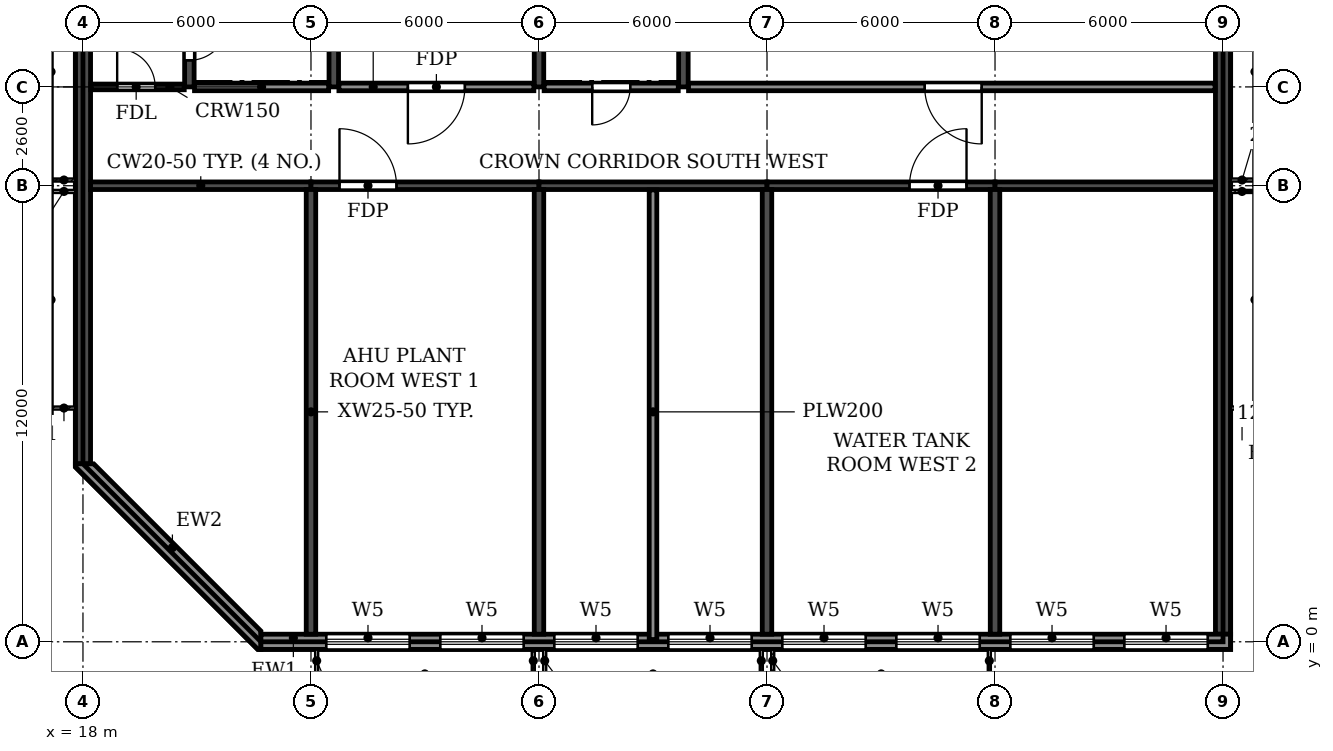
"""IFC4 building model, lengths in metres.
Left out: names, types, materials, properties, quantities, classifications, styles, units other than length and angle.
Written with IfcOpenShell. Run it as: python <this file> out.ifc"""

import sys

from ifc_helpers import new_model, si_unit, direction, frame, frame_2d, origin, place, context, subcontext, project, spatial, polyline, rectangle, outline, extrude, element, fill, save


model = new_model("IFC4")
c1 = context("Model", 3, precision=1e-05, world=origin(), true_north=direction((0.0, 1.0)))
c2 = subcontext(c1, "Body", "Model", "MODEL_VIEW")
j1 = project(units=[si_unit("LENGTHUNIT", "METRE"), si_unit("PLANEANGLEUNIT", "RADIAN")], contexts=[c1])
p1 = place(None, origin())
s1 = spatial("IfcSite", under=j1, at=p1, CompositionType="ELEMENT")
p2 = place(p1, origin())
s2 = spatial("IfcBuilding", under=s1, at=p2, CompositionType="ELEMENT")
p3 = place(p2, frame((0.0, 0.0, 288.9)))
s3 = spatial("IfcBuildingStorey", under=s2, at=p3, CompositionType="ELEMENT", Elevation=288.9)
for number, where, z_axis, x_axis in (
    (1, (24.0, 0.2, 0.0), (0.0, 0.0, 1.0), (0.0, 1.0, 0.0)),
    (2, (30.0, 0.2, 0.0), (0.0, 0.0, 1.0), (0.0, 1.0, 0.0)),
    (3, (36.0, 0.2, 0.0), (0.0, 0.0, 1.0), (0.0, 1.0, 0.0)),
    (4, (42.0, 0.2, 0.0), (0.0, 0.0, 1.0), (0.0, 1.0, 0.0)),
):
    element("IfcWall", number, at=place(p3, frame(where, z_axis=z_axis, x_axis=x_axis)), inside=s3, PredefinedType="SHEAR", context=c2, shape_type="SweptSolid", body=[
        extrude(rectangle(XDim=11.7, YDim=0.25, at=frame_2d((5.85, 0.0))), origin(), (0.0, 0.0, 1.0), 3.05),
    ])
p4 = place(p3, frame((18.0, 4.683, 0.0), z_axis=(0.0, 0.0, 1.0), x_axis=(0.0, 1.0, 0.0)))
e5 = element("IfcWall", 5, at=p4, inside=s3, PredefinedType="SHEAR", context=c2, shape_type="SweptSolid", body=[
    extrude(rectangle(XDim=31.834, YDim=0.4, at=frame_2d((15.917, 0.0))), origin(), (0.0, 0.0, 1.0), 3.05),
])
p5 = place(p3, frame((48.0, 0.2, 0.0), z_axis=(0.0, 0.0, 1.0), x_axis=(0.0, 1.0, 0.0)))
e6 = element("IfcWall", 6, at=p5, inside=s3, PredefinedType="SHEAR", context=c2, shape_type="SweptSolid", body=[
    extrude(rectangle(XDim=40.8, YDim=0.4, at=frame_2d((20.4, 0.0))), origin(), (0.0, 0.0, 1.0), 3.05),
])
p6 = place(p3, frame((18.2, 12.0, 0.0), z_axis=(0.0, 0.0, 1.0), x_axis=(1.0, 0.0, 0.0)))
e7 = element("IfcWall", 7, at=p6, inside=s3, PredefinedType="SHEAR", context=c2, shape_type="SweptSolid", body=[
    extrude(rectangle(XDim=5.8, YDim=0.2, at=frame_2d((2.9, 0.0))), origin(), (0.0, 0.0, 1.0), 2.45),
])
p7 = place(p3, frame((24.0, 12.0, 0.0), z_axis=(0.0, 0.0, 1.0), x_axis=(1.0, 0.0, 0.0)))
e8 = element("IfcWall", 8, at=p7, inside=s3, PredefinedType="SHEAR", context=c2, shape_type="SweptSolid", body=[
    extrude(rectangle(XDim=6.0, YDim=0.2, at=frame_2d((3.0, 0.0))), origin(), (0.0, 0.0, 1.0), 2.45),
])
p8 = place(p7, frame((0.75, 0.0, 0.0)))
e9 = element("IfcOpeningElement", 9, at=p8, cuts=e8, PredefinedType="OPENING", context=c2, shape_type="SweptSolid", body=[
    extrude(rectangle(XDim=1.5, YDim=2.1, at=frame_2d((0.75, 1.05))), frame((0.0, 0.11, 0.0), z_axis=(0.0, -1.0, 0.0), x_axis=(1.0, 0.0, 0.0)), (0.0, 0.0, 1.0), 0.22),
])
p9 = place(p3, frame((30.0, 12.0, 0.0), z_axis=(0.0, 0.0, 1.0), x_axis=(1.0, 0.0, 0.0)))
e10 = element("IfcWall", 10, at=p9, inside=s3, PredefinedType="SHEAR", context=c2, shape_type="SweptSolid", body=[
    extrude(rectangle(XDim=6.0, YDim=0.2, at=frame_2d((3.0, 0.0))), origin(), (0.0, 0.0, 1.0), 2.45),
])
p10 = place(p3, frame((36.0, 12.0, 0.0), z_axis=(0.0, 0.0, 1.0), x_axis=(1.0, 0.0, 0.0)))
e11 = element("IfcWall", 11, at=p10, inside=s3, PredefinedType="SHEAR", context=c2, shape_type="SweptSolid", body=[
    extrude(rectangle(XDim=6.0, YDim=0.2, at=frame_2d((3.0, 0.0))), origin(), (0.0, 0.0, 1.0), 2.45),
])
p11 = place(p10, frame((3.75, 0.0, 0.0)))
e12 = element("IfcOpeningElement", 12, at=p11, cuts=e11, PredefinedType="OPENING", context=c2, shape_type="SweptSolid", body=[
    extrude(rectangle(XDim=1.5, YDim=2.1, at=frame_2d((0.75, 1.05))), frame((0.0, 0.11, 0.0), z_axis=(0.0, -1.0, 0.0), x_axis=(1.0, 0.0, 0.0)), (0.0, 0.0, 1.0), 0.22),
])
p12 = place(p3, frame((42.0, 12.0, 0.0), z_axis=(0.0, 0.0, 1.0), x_axis=(1.0, 0.0, 0.0)))
e13 = element("IfcWall", 13, at=p12, inside=s3, PredefinedType="SHEAR", context=c2, shape_type="SweptSolid", body=[
    extrude(rectangle(XDim=5.8, YDim=0.2, at=frame_2d((2.9, 0.0))), origin(), (0.0, 0.0, 1.0), 2.45),
])
p13 = place(p3, frame((20.8, 14.6, 0.0), z_axis=(0.0, 0.0, 1.0), x_axis=(0.0, 1.0, 0.0)))
e14 = element("IfcWall", 14, at=p13, inside=s3, PredefinedType="SOLIDWALL", context=c2, shape_type="SweptSolid", body=[
    extrude(rectangle(XDim=7.875, YDim=0.25, at=frame_2d((3.938, 0.0))), origin(), (0.0, 0.0, 1.0), 3.05),
])
p14 = place(p13, frame((0.7, 0.0, 0.0)))
e15 = element("IfcOpeningElement", 15, at=p14, cuts=e14, PredefinedType="OPENING", context=c2, shape_type="SweptSolid", body=[
    extrude(rectangle(XDim=1.0, YDim=2.1, at=frame_2d((0.5, 1.05))), frame((0.0, 0.135, 0.0), z_axis=(0.0, -1.0, 0.0), x_axis=(1.0, 0.0, 0.0)), (0.0, 0.0, 1.0), 0.27),
])
for number, where, z_axis, x_axis in (
    (16, (24.6, 14.6, 0.0), (0.0, 0.0, 1.0), (0.0, 1.0, 0.0)),
    (17, (30.0, 14.6, 0.0), (0.0, 0.0, 1.0), (0.0, 1.0, 0.0)),
    (18, (33.8, 14.6, 0.0), (0.0, 0.0, 1.0), (0.0, 1.0, 0.0)),
):
    element("IfcWall", number, at=place(p3, frame(where, z_axis=z_axis, x_axis=x_axis)), inside=s3, PredefinedType="SOLIDWALL", context=c2, shape_type="SweptSolid", body=[
        extrude(rectangle(XDim=7.875, YDim=0.25, at=frame_2d((3.938, 0.0))), origin(), (0.0, 0.0, 1.0), 3.05),
    ])
p15 = place(p3, frame((22.683, 0.0, 0.0), z_axis=(0.0, 0.0, 1.0), x_axis=(1.0, 0.0, 0.0)))
e19 = element("IfcWall", 19, at=p15, inside=s3, PredefinedType="STANDARD", context=c2, shape_type="SweptSolid", body=[
    extrude(rectangle(XDim=25.517, YDim=0.4, at=frame_2d((12.759, 0.0))), origin(), (0.0, 0.0, 1.0), 3.05),
])
p16 = place(p15, frame((1.717, 0.0, 0.6)))
e20 = element("IfcOpeningElement", 20, at=p16, cuts=e19, PredefinedType="OPENING", context=c2, shape_type="SweptSolid", body=[
    extrude(rectangle(XDim=2.2, YDim=2.4, at=frame_2d((1.1, 1.2))), frame((0.0, 0.21, 0.0), z_axis=(0.0, -1.0, 0.0), x_axis=(1.0, 0.0, 0.0)), (0.0, 0.0, 1.0), 0.42),
])
p17 = place(p15, frame((4.717, 0.0, 0.6)))
e21 = element("IfcOpeningElement", 21, at=p17, cuts=e19, PredefinedType="OPENING", context=c2, shape_type="SweptSolid", body=[
    extrude(rectangle(XDim=2.2, YDim=2.4, at=frame_2d((1.1, 1.2))), frame((0.0, 0.21, 0.0), z_axis=(0.0, -1.0, 0.0), x_axis=(1.0, 0.0, 0.0)), (0.0, 0.0, 1.0), 0.42),
])
p18 = place(p15, frame((7.717, 0.0, 0.6)))
e22 = element("IfcOpeningElement", 22, at=p18, cuts=e19, PredefinedType="OPENING", context=c2, shape_type="SweptSolid", body=[
    extrude(rectangle(XDim=2.2, YDim=2.4, at=frame_2d((1.1, 1.2))), frame((0.0, 0.21, 0.0), z_axis=(0.0, -1.0, 0.0), x_axis=(1.0, 0.0, 0.0)), (0.0, 0.0, 1.0), 0.42),
])
p19 = place(p15, frame((10.717, 0.0, 0.6)))
e23 = element("IfcOpeningElement", 23, at=p19, cuts=e19, PredefinedType="OPENING", context=c2, shape_type="SweptSolid", body=[
    extrude(rectangle(XDim=2.2, YDim=2.4, at=frame_2d((1.1, 1.2))), frame((0.0, 0.21, 0.0), z_axis=(0.0, -1.0, 0.0), x_axis=(1.0, 0.0, 0.0)), (0.0, 0.0, 1.0), 0.42),
])
p20 = place(p15, frame((13.717, 0.0, 0.6)))
e24 = element("IfcOpeningElement", 24, at=p20, cuts=e19, PredefinedType="OPENING", context=c2, shape_type="SweptSolid", body=[
    extrude(rectangle(XDim=2.2, YDim=2.4, at=frame_2d((1.1, 1.2))), frame((0.0, 0.21, 0.0), z_axis=(0.0, -1.0, 0.0), x_axis=(1.0, 0.0, 0.0)), (0.0, 0.0, 1.0), 0.42),
])
p21 = place(p15, frame((16.717, 0.0, 0.6)))
e25 = element("IfcOpeningElement", 25, at=p21, cuts=e19, PredefinedType="OPENING", context=c2, shape_type="SweptSolid", body=[
    extrude(rectangle(XDim=2.2, YDim=2.4, at=frame_2d((1.1, 1.2))), frame((0.0, 0.21, 0.0), z_axis=(0.0, -1.0, 0.0), x_axis=(1.0, 0.0, 0.0)), (0.0, 0.0, 1.0), 0.42),
])
p22 = place(p15, frame((19.717, 0.0, 0.6)))
e26 = element("IfcOpeningElement", 26, at=p22, cuts=e19, PredefinedType="OPENING", context=c2, shape_type="SweptSolid", body=[
    extrude(rectangle(XDim=2.2, YDim=2.4, at=frame_2d((1.1, 1.2))), frame((0.0, 0.21, 0.0), z_axis=(0.0, -1.0, 0.0), x_axis=(1.0, 0.0, 0.0)), (0.0, 0.0, 1.0), 0.42),
])
p23 = place(p15, frame((22.717, 0.0, 0.6)))
e27 = element("IfcOpeningElement", 27, at=p23, cuts=e19, PredefinedType="OPENING", context=c2, shape_type="SweptSolid", body=[
    extrude(rectangle(XDim=2.2, YDim=2.4, at=frame_2d((1.1, 1.2))), frame((0.0, 0.21, 0.0), z_axis=(0.0, -1.0, 0.0), x_axis=(1.0, 0.0, 0.0)), (0.0, 0.0, 1.0), 0.42),
])
p24 = place(p3, origin())
e28 = element("IfcWall", 28, at=p24, inside=s3, PredefinedType="STANDARD", context=c2, shape_type="SweptSolid", body=[
    extrude(outline(polyline([(17.8, 4.683), (17.8, 4.6), (22.6, -0.2), (22.683, -0.2), (22.683, 0.283), (18.283, 4.683), (17.8, 4.683)])), origin(), (0.0, 0.0, 1.0), 3.05),
])
p25 = place(p3, frame((0.0, 0.0, 3.3)))
e29 = element("IfcWall", 29, at=p25, inside=s3, PredefinedType="PARAPET", context=c2, shape_type="SweptSolid", body=[
    extrude(outline(polyline([(22.6, -0.2), (48.2, -0.2), (48.2, 41.4), (22.6, 41.4), (17.8, 36.6), (17.8, 4.6), (22.6, -0.2)]), holes=[polyline([(22.683, 0.0), (18.0, 4.683), (18.0, 36.517), (22.683, 41.2), (48.0, 41.2), (48.0, 0.0), (22.683, 0.0)])]), origin(), (0.0, 0.0, 1.0), 1.1),
])
p26 = place(p3, frame((18.21, 14.6, 0.0), z_axis=(0.0, 0.0, 1.0), x_axis=(1.0, 0.0, 0.0)))
e30 = element("IfcWall", 30, at=p26, inside=s3, PredefinedType="PARTITIONING", context=c2, shape_type="SweptSolid", body=[
    extrude(rectangle(XDim=2.455, YDim=0.15, at=frame_2d((1.228, 0.0))), origin(), (0.0, 0.0, 1.0), 3.05),
])
p27 = place(p26, frame((0.69, 0.0, 0.0)))
e31 = element("IfcOpeningElement", 31, at=p27, cuts=e30, PredefinedType="OPENING", context=c2, shape_type="SweptSolid", body=[
    extrude(rectangle(XDim=1.0, YDim=2.1, at=frame_2d((0.5, 1.05))), frame((0.0, 0.085, 0.0), z_axis=(0.0, -1.0, 0.0), x_axis=(1.0, 0.0, 0.0)), (0.0, 0.0, 1.0), 0.17),
])
p28 = place(p3, frame((24.735, 14.6, 0.0), z_axis=(0.0, 0.0, 1.0), x_axis=(1.0, 0.0, 0.0)))
e32 = element("IfcWall", 32, at=p28, inside=s3, PredefinedType="PARTITIONING", context=c2, shape_type="SweptSolid", body=[
    extrude(rectangle(XDim=5.13, YDim=0.2, at=frame_2d((2.565, 0.0))), origin(), (0.0, 0.0, 1.0), 3.05),
])
p29 = place(p28, frame((1.815, 0.0, 0.0)))
e33 = element("IfcOpeningElement", 33, at=p29, cuts=e32, PredefinedType="OPENING", context=c2, shape_type="SweptSolid", body=[
    extrude(rectangle(XDim=1.5, YDim=2.1, at=frame_2d((0.75, 1.05))), frame((0.0, 0.11, 0.0), z_axis=(0.0, -1.0, 0.0), x_axis=(1.0, 0.0, 0.0)), (0.0, 0.0, 1.0), 0.22),
])
p30 = place(p3, frame((33.935, 14.6, 0.0), z_axis=(0.0, 0.0, 1.0), x_axis=(1.0, 0.0, 0.0)))
e34 = element("IfcWall", 34, at=p30, inside=s3, PredefinedType="PARTITIONING", context=c2, shape_type="SweptSolid", body=[
    extrude(rectangle(XDim=13.855, YDim=0.2, at=frame_2d((6.927, 0.0))), origin(), (0.0, 0.0, 1.0), 3.05),
])
p31 = place(p30, frame((6.215, 0.0, 0.0)))
e35 = element("IfcOpeningElement", 35, at=p31, cuts=e34, PredefinedType="OPENING", context=c2, shape_type="SweptSolid", body=[
    extrude(rectangle(XDim=1.5, YDim=2.1, at=frame_2d((0.75, 1.05))), frame((0.0, 0.11, 0.0), z_axis=(0.0, -1.0, 0.0), x_axis=(1.0, 0.0, 0.0)), (0.0, 0.0, 1.0), 0.22),
])
p32 = place(p3, frame((33.0, 0.06, 0.0), z_axis=(0.0, 0.0, 1.0), x_axis=(0.0, 1.0, 0.0)))
e36 = element("IfcWall", 36, at=p32, inside=s3, PredefinedType="PARTITIONING", context=c2, shape_type="SweptSolid", body=[
    extrude(rectangle(XDim=11.83, YDim=0.2, at=frame_2d((5.915, 0.0))), origin(), (0.0, 0.0, 1.0), 3.05),
])
p33 = place(p3, frame((20.935, 14.6, 0.0), z_axis=(0.0, 0.0, 1.0), x_axis=(1.0, 0.0, 0.0)))
e37 = element("IfcWall", 37, at=p33, inside=s3, PredefinedType="PARTITIONING", context=c2, shape_type="SweptSolid", body=[
    extrude(rectangle(XDim=3.53, YDim=0.2, at=frame_2d((1.765, 0.0))), origin(), (0.0, 0.0, 1.0), 3.05),
])
p34 = place(p3, frame((30.135, 14.6, 0.0), z_axis=(0.0, 0.0, 1.0), x_axis=(1.0, 0.0, 0.0)))
e38 = element("IfcWall", 38, at=p34, inside=s3, PredefinedType="PARTITIONING", context=c2, shape_type="SweptSolid", body=[
    extrude(rectangle(XDim=3.53, YDim=0.2, at=frame_2d((1.765, 0.0))), origin(), (0.0, 0.0, 1.0), 3.05),
])
p35 = place(p34, frame((1.265, 0.0, 0.0)))
e39 = element("IfcOpeningElement", 39, at=p35, cuts=e38, PredefinedType="OPENING", context=c2, shape_type="SweptSolid", body=[
    extrude(rectangle(XDim=1.0, YDim=2.1, at=frame_2d((0.5, 1.05))), frame((0.0, 0.11, 0.0), z_axis=(0.0, -1.0, 0.0), x_axis=(1.0, 0.0, 0.0)), (0.0, 0.0, 1.0), 0.22),
])
p36 = place(p16, origin())
e40 = element("IfcWindow", 40, at=p36, inside=s3, PartitioningType="TRIPLE_PANEL_HORIZONTAL", PredefinedType="WINDOW", context=c2, shape_type="SweptSolid", body=[
    extrude(rectangle(XDim=2.2, YDim=2.4, at=frame_2d((1.1, 1.2))), frame((0.0, 0.03, 0.0), z_axis=(0.0, -1.0, 0.0), x_axis=(1.0, 0.0, 0.0)), (0.0, 0.0, 1.0), 0.06),
])
fill(e20, e40)
p37 = place(p17, origin())
e41 = element("IfcWindow", 41, at=p37, inside=s3, PartitioningType="TRIPLE_PANEL_HORIZONTAL", PredefinedType="WINDOW", context=c2, shape_type="SweptSolid", body=[
    extrude(rectangle(XDim=2.2, YDim=2.4, at=frame_2d((1.1, 1.2))), frame((0.0, 0.03, 0.0), z_axis=(0.0, -1.0, 0.0), x_axis=(1.0, 0.0, 0.0)), (0.0, 0.0, 1.0), 0.06),
])
fill(e21, e41)
p38 = place(p18, origin())
e42 = element("IfcWindow", 42, at=p38, inside=s3, PartitioningType="TRIPLE_PANEL_HORIZONTAL", PredefinedType="WINDOW", context=c2, shape_type="SweptSolid", body=[
    extrude(rectangle(XDim=2.2, YDim=2.4, at=frame_2d((1.1, 1.2))), frame((0.0, 0.03, 0.0), z_axis=(0.0, -1.0, 0.0), x_axis=(1.0, 0.0, 0.0)), (0.0, 0.0, 1.0), 0.06),
])
fill(e22, e42)
p39 = place(p19, origin())
e43 = element("IfcWindow", 43, at=p39, inside=s3, PartitioningType="TRIPLE_PANEL_HORIZONTAL", PredefinedType="WINDOW", context=c2, shape_type="SweptSolid", body=[
    extrude(rectangle(XDim=2.2, YDim=2.4, at=frame_2d((1.1, 1.2))), frame((0.0, 0.03, 0.0), z_axis=(0.0, -1.0, 0.0), x_axis=(1.0, 0.0, 0.0)), (0.0, 0.0, 1.0), 0.06),
])
fill(e23, e43)
p40 = place(p20, origin())
e44 = element("IfcWindow", 44, at=p40, inside=s3, PartitioningType="TRIPLE_PANEL_HORIZONTAL", PredefinedType="WINDOW", context=c2, shape_type="SweptSolid", body=[
    extrude(rectangle(XDim=2.2, YDim=2.4, at=frame_2d((1.1, 1.2))), frame((0.0, 0.03, 0.0), z_axis=(0.0, -1.0, 0.0), x_axis=(1.0, 0.0, 0.0)), (0.0, 0.0, 1.0), 0.06),
])
fill(e24, e44)
p41 = place(p21, origin())
e45 = element("IfcWindow", 45, at=p41, inside=s3, PartitioningType="TRIPLE_PANEL_HORIZONTAL", PredefinedType="WINDOW", context=c2, shape_type="SweptSolid", body=[
    extrude(rectangle(XDim=2.2, YDim=2.4, at=frame_2d((1.1, 1.2))), frame((0.0, 0.03, 0.0), z_axis=(0.0, -1.0, 0.0), x_axis=(1.0, 0.0, 0.0)), (0.0, 0.0, 1.0), 0.06),
])
fill(e25, e45)
p42 = place(p22, origin())
e46 = element("IfcWindow", 46, at=p42, inside=s3, PartitioningType="TRIPLE_PANEL_HORIZONTAL", PredefinedType="WINDOW", context=c2, shape_type="SweptSolid", body=[
    extrude(rectangle(XDim=2.2, YDim=2.4, at=frame_2d((1.1, 1.2))), frame((0.0, 0.03, 0.0), z_axis=(0.0, -1.0, 0.0), x_axis=(1.0, 0.0, 0.0)), (0.0, 0.0, 1.0), 0.06),
])
fill(e26, e46)
p43 = place(p23, origin())
e47 = element("IfcWindow", 47, at=p43, inside=s3, PartitioningType="TRIPLE_PANEL_HORIZONTAL", PredefinedType="WINDOW", context=c2, shape_type="SweptSolid", body=[
    extrude(rectangle(XDim=2.2, YDim=2.4, at=frame_2d((1.1, 1.2))), frame((0.0, 0.03, 0.0), z_axis=(0.0, -1.0, 0.0), x_axis=(1.0, 0.0, 0.0)), (0.0, 0.0, 1.0), 0.06),
])
fill(e27, e47)
p44 = place(p8, origin())
e48 = element("IfcDoor", 48, at=p44, inside=s3, OperationType="DOUBLE_DOOR_SINGLE_SWING", PredefinedType="DOOR", context=c2, shape_type="SweptSolid", body=[
    extrude(rectangle(XDim=1.5, YDim=2.1, at=frame_2d((0.75, 1.05))), frame((0.0, 0.025, 0.0), z_axis=(0.0, -1.0, 0.0), x_axis=(1.0, 0.0, 0.0)), (0.0, 0.0, 1.0), 0.05),
])
fill(e9, e48)
p45 = place(p29, frame((1.5, 0.0, 0.0), z_axis=(0.0, 0.0, 1.0), x_axis=(-1.0, 0.0, 0.0)))
e49 = element("IfcDoor", 49, at=p45, inside=s3, OperationType="DOUBLE_DOOR_SINGLE_SWING", PredefinedType="DOOR", context=c2, shape_type="SweptSolid", body=[
    extrude(rectangle(XDim=1.5, YDim=2.1, at=frame_2d((0.75, 1.05))), frame((0.0, 0.025, 0.0), z_axis=(0.0, -1.0, 0.0), x_axis=(1.0, 0.0, 0.0)), (0.0, 0.0, 1.0), 0.05),
])
fill(e33, e49)
p46 = place(p11, origin())
e50 = element("IfcDoor", 50, at=p46, inside=s3, OperationType="DOUBLE_DOOR_SINGLE_SWING", PredefinedType="DOOR", context=c2, shape_type="SweptSolid", body=[
    extrude(rectangle(XDim=1.5, YDim=2.1, at=frame_2d((0.75, 1.05))), frame((0.0, 0.025, 0.0), z_axis=(0.0, -1.0, 0.0), x_axis=(1.0, 0.0, 0.0)), (0.0, 0.0, 1.0), 0.05),
])
fill(e12, e50)
p47 = place(p31, frame((1.5, 0.0, 0.0), z_axis=(0.0, 0.0, 1.0), x_axis=(-1.0, 0.0, 0.0)))
e51 = element("IfcDoor", 51, at=p47, inside=s3, OperationType="DOUBLE_DOOR_SINGLE_SWING", PredefinedType="DOOR", context=c2, shape_type="SweptSolid", body=[
    extrude(rectangle(XDim=1.5, YDim=2.1, at=frame_2d((0.75, 1.05))), frame((0.0, 0.025, 0.0), z_axis=(0.0, -1.0, 0.0), x_axis=(1.0, 0.0, 0.0)), (0.0, 0.0, 1.0), 0.05),
])
fill(e35, e51)
p48 = place(p27, origin())
e52 = element("IfcDoor", 52, at=p48, inside=s3, OperationType="SINGLE_SWING_LEFT", PredefinedType="DOOR", context=c2, shape_type="SweptSolid", body=[
    extrude(rectangle(XDim=1.0, YDim=2.1, at=frame_2d((0.5, 1.05))), frame((0.0, 0.025, 0.0), z_axis=(0.0, -1.0, 0.0), x_axis=(1.0, 0.0, 0.0)), (0.0, 0.0, 1.0), 0.05),
])
fill(e31, e52)
p49 = place(p14, frame((1.0, 0.0, 0.0), z_axis=(0.0, 0.0, 1.0), x_axis=(-1.0, 0.0, 0.0)))
e53 = element("IfcDoor", 53, at=p49, inside=s3, OperationType="SINGLE_SWING_LEFT", PredefinedType="DOOR", context=c2, shape_type="SweptSolid", body=[
    extrude(rectangle(XDim=1.0, YDim=2.1, at=frame_2d((0.5, 1.05))), frame((0.0, 0.025, 0.0), z_axis=(0.0, -1.0, 0.0), x_axis=(1.0, 0.0, 0.0)), (0.0, 0.0, 1.0), 0.05),
])
fill(e15, e53)
p50 = place(p35, frame((1.0, 0.0, 0.0), z_axis=(0.0, 0.0, 1.0), x_axis=(-1.0, 0.0, 0.0)))
e54 = element("IfcDoor", 54, at=p50, inside=s3, OperationType="SINGLE_SWING_RIGHT", PredefinedType="DOOR", context=c2, shape_type="SweptSolid", body=[
    extrude(rectangle(XDim=1.0, YDim=2.1, at=frame_2d((0.5, 1.05))), frame((0.0, 0.025, 0.0), z_axis=(0.0, -1.0, 0.0), x_axis=(1.0, 0.0, 0.0)), (0.0, 0.0, 1.0), 0.05),
])
fill(e39, e54)
save(model, sys.argv[1])
